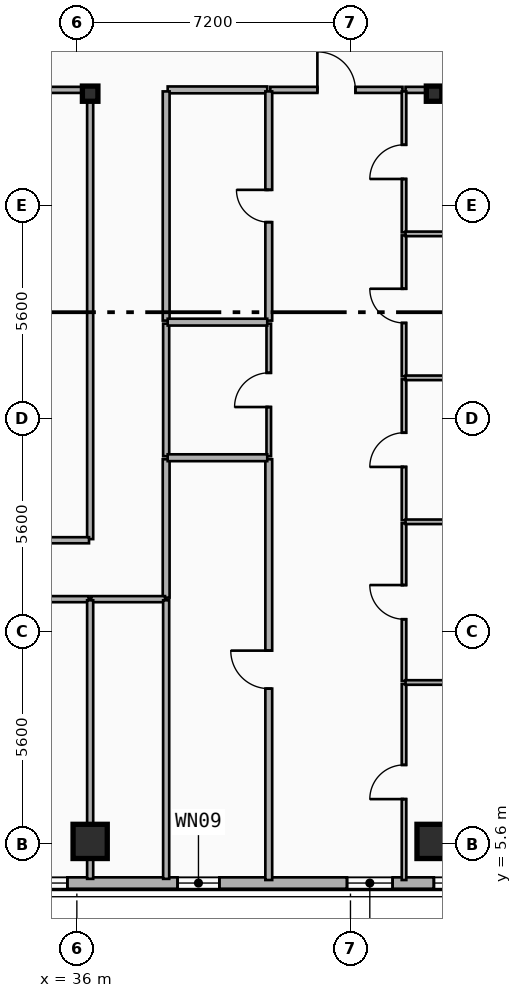
"""IFC4 building model, lengths in metres.
Left out: names, types, materials, properties, quantities, classifications, styles, units other than length and angle.
Written with IfcOpenShell. Run it as: python <this file> out.ifc"""

import sys

from ifc_helpers import new_model, si_unit, direction, frame, frame_2d, origin, origin_2d, place, context, subcontext, project, spatial, rectangle, i_section, extrude, element, fill, save


model = new_model("IFC4")
c1 = context("Model", 3, precision=1e-05, world=origin(), true_north=direction((0.0, 1.0)))
c2 = subcontext(c1, "Body", "Model", "MODEL_VIEW")
j1 = project(units=[si_unit("LENGTHUNIT", "METRE"), si_unit("PLANEANGLEUNIT", "RADIAN")], contexts=[c1])
p1 = place(None, origin())
s1 = spatial("IfcSite", under=j1, at=p1, CompositionType="ELEMENT")
p2 = place(p1, origin())
s2 = spatial("IfcBuilding", under=s1, at=p2, CompositionType="ELEMENT")
p3 = place(p2, frame((0.0, 0.0, 225.6)))
s3 = spatial("IfcBuildingStorey", under=s2, at=p3, CompositionType="ELEMENT", Elevation=225.6)
for number, where, z_axis, x_axis in (
    (1, (36.35, 25.35, 0.0), (0.0, 0.0, 1.0), (1.0, 0.0, 0.0)),
    (2, (45.4, 25.35, 0.0), (0.0, 0.0, 1.0), (1.0, 0.0, 0.0)),
):
    element("IfcColumn", number, at=place(p3, frame(where, z_axis=z_axis, x_axis=x_axis)), inside=s3, PredefinedType="COLUMN", context=c2, shape_type="SweptSolid", body=[
        extrude(i_section(OverallWidth=0.408, OverallDepth=0.4, WebThickness=0.025, FlangeThickness=0.039, FilletRadius=0.015, at=origin_2d()), origin(), (0.0, 0.0, 1.0), 3.6),
    ])
for number, where, z_axis, x_axis in (
    (3, (36.35, 5.784, 0.0), (0.0, -0.09, 0.996), (1.0, 0.0, 0.0)),
    (4, (45.4, 5.784, 0.0), (0.0, -0.09, 0.996), (1.0, 0.0, 0.0)),
):
    element("IfcColumn", number, at=place(p3, frame(where, z_axis=z_axis, x_axis=x_axis)), inside=s3, PredefinedType="COLUMN", context=c2, shape_type="SweptSolid", body=[
        extrude(rectangle(XDim=0.9, YDim=0.9, at=origin_2d()), origin(), (0.0, 0.0, 1.0), 3.615),
    ])
p4 = place(p3, frame((48.0, 4.58, 0.0), z_axis=(0.0, 0.0, 1.0), x_axis=(-1.0, 0.0, 0.0)))
e5 = element("IfcWall", 5, at=p4, inside=s3, PredefinedType="SOLIDWALL", context=c2, shape_type="SweptSolid", body=[
    extrude(rectangle(XDim=38.4, YDim=0.3, at=frame_2d((19.2, 0.0))), origin(), (0.0, 0.0, 1.0), 3.34),
])
p5 = place(p4, frame((33.709, 0.0, 0.34)))
e6 = element("IfcOpeningElement", 6, at=p5, cuts=e5, PredefinedType="OPENING", context=c2, shape_type="SweptSolid", body=[
    extrude(rectangle(XDim=1.4, YDim=1.8, at=frame_2d((0.7, 0.9))), frame((0.0, 0.16, 0.0), z_axis=(0.0, -1.0, 0.0), x_axis=(1.0, 0.0, 0.0)), (0.0, 0.0, 1.0), 0.32),
])
p6 = place(p4, frame((29.45, 0.0, 1.85)))
e7 = element("IfcOpeningElement", 7, at=p6, cuts=e5, PredefinedType="OPENING", context=c2, shape_type="SweptSolid", body=[
    extrude(rectangle(XDim=1.1, YDim=0.9, at=frame_2d((0.55, 0.45))), frame((0.0, 0.16, 0.0), z_axis=(0.0, -1.0, 0.0), x_axis=(1.0, 0.0, 0.0)), (0.0, 0.0, 1.0), 0.32),
])
p7 = place(p4, frame((35.994, 0.0, 0.48)))
e8 = element("IfcOpeningElement", 8, at=p7, cuts=e5, PredefinedType="OPENING", context=c2, shape_type="SweptSolid", body=[
    extrude(rectangle(XDim=1.8, YDim=1.8, at=frame_2d((0.9, 0.9))), frame((0.0, 0.16, 0.0), z_axis=(0.0, -1.0, 0.0), x_axis=(1.0, 0.0, 0.0)), (0.0, 0.0, 1.0), 0.32),
])
p8 = place(p4, frame((14.65, 0.0, 0.65)))
e9 = element("IfcOpeningElement", 9, at=p8, cuts=e5, PredefinedType="OPENING", context=c2, shape_type="SweptSolid", body=[
    extrude(rectangle(XDim=2.0, YDim=2.2, at=frame_2d((1.0, 1.1))), frame((0.0, 0.16, 0.0), z_axis=(0.0, -1.0, 0.0), x_axis=(1.0, 0.0, 0.0)), (0.0, 0.0, 1.0), 0.32),
])
p9 = place(p4, frame((23.4, 0.0, 0.65)))
e10 = element("IfcOpeningElement", 10, at=p9, cuts=e5, PredefinedType="OPENING", context=c2, shape_type="SweptSolid", body=[
    extrude(rectangle(XDim=2.0, YDim=2.2, at=frame_2d((1.0, 1.1))), frame((0.0, 0.16, 0.0), z_axis=(0.0, -1.0, 0.0), x_axis=(1.0, 0.0, 0.0)), (0.0, 0.0, 1.0), 0.32),
])
p10 = place(p4, frame((12.25, 0.0, 0.8)))
e11 = element("IfcOpeningElement", 11, at=p10, cuts=e5, PredefinedType="OPENING", context=c2, shape_type="SweptSolid", body=[
    extrude(rectangle(XDim=1.8, YDim=1.8, at=frame_2d((0.9, 0.9))), frame((0.0, 0.16, 0.0), z_axis=(0.0, -1.0, 0.0), x_axis=(1.0, 0.0, 0.0)), (0.0, 0.0, 1.0), 0.32),
])
p11 = place(p4, frame((3.691, 0.0, 1.22)))
e12 = element("IfcOpeningElement", 12, at=p11, cuts=e5, PredefinedType="OPENING", context=c2, shape_type="SweptSolid", body=[
    extrude(rectangle(XDim=1.2, YDim=1.5, at=frame_2d((0.6, 0.75))), frame((0.0, 0.16, 0.0), z_axis=(0.0, -1.0, 0.0), x_axis=(1.0, 0.0, 0.0)), (0.0, 0.0, 1.0), 0.32),
])
p12 = place(p4, frame((8.25, 0.0, 0.52)))
e13 = element("IfcOpeningElement", 13, at=p12, cuts=e5, PredefinedType="OPENING", context=c2, shape_type="SweptSolid", body=[
    extrude(rectangle(XDim=1.1, YDim=1.05, at=frame_2d((0.55, 0.525))), frame((0.0, 0.16, 0.0), z_axis=(0.0, -1.0, 0.0), x_axis=(1.0, 0.0, 0.0)), (0.0, 0.0, 1.0), 0.32),
])
p13 = place(p4, frame((0.805, 0.0, 0.48)))
e14 = element("IfcOpeningElement", 14, at=p13, cuts=e5, PredefinedType="OPENING", context=c2, shape_type="SweptSolid", body=[
    extrude(rectangle(XDim=1.8, YDim=1.8, at=frame_2d((0.9, 0.9))), frame((0.0, 0.16, 0.0), z_axis=(0.0, -1.0, 0.0), x_axis=(1.0, 0.0, 0.0)), (0.0, 0.0, 1.0), 0.32),
])
p14 = place(p3, frame((41.09, 25.45, 0.0), z_axis=(0.0, 0.0, 1.0), x_axis=(1.0, 0.0, 0.0)))
e15 = element("IfcWall", 15, at=p14, inside=s3, PredefinedType="PARTITIONING", context=c2, shape_type="SweptSolid", body=[
    extrude(rectangle(XDim=3.479, YDim=0.16, at=frame_2d((1.74, 0.0))), origin(), (0.0, 0.0, 1.0), 3.34),
])
p15 = place(p14, frame((1.24, 0.0, 0.0)))
e16 = element("IfcOpeningElement", 16, at=p15, cuts=e15, PredefinedType="OPENING", context=c2, shape_type="SweptSolid", body=[
    extrude(rectangle(XDim=1.0, YDim=2.15, at=frame_2d((0.5, 1.075))), frame((0.0, 0.09, 0.0), z_axis=(0.0, -1.0, 0.0), x_axis=(1.0, 0.0, 0.0)), (0.0, 0.0, 1.0), 0.18),
])
p16 = place(p3, frame((38.39, 25.45, 0.0), z_axis=(0.0, 0.0, 1.0), x_axis=(1.0, 0.0, 0.0)))
e17 = element("IfcWall", 17, at=p16, inside=s3, PredefinedType="PLUMBINGWALL", context=c2, shape_type="SweptSolid", body=[
    extrude(rectangle(XDim=2.62, YDim=0.18, at=frame_2d((1.31, 0.0))), origin(), (0.0, 0.0, 1.0), 3.34),
])
p17 = place(p3, frame((44.649, 25.45, 0.0), z_axis=(0.0, 0.0, 1.0), x_axis=(1.0, 0.0, 0.0)))
e18 = element("IfcWall", 18, at=p17, inside=s3, PredefinedType="PARTITIONING", context=c2, shape_type="SweptSolid", body=[
    extrude(rectangle(XDim=7.291, YDim=0.16, at=frame_2d((3.646, 0.0))), origin(), (0.0, 0.0, 1.0), 2.52),
])
p18 = place(p3, frame((38.35, 12.09, 0.0), z_axis=(0.0, 0.0, 1.0), x_axis=(0.0, 1.0, 0.0)))
e19 = element("IfcWall", 19, at=p18, inside=s3, PredefinedType="PLUMBINGWALL", context=c2, shape_type="SweptSolid", body=[
    extrude(rectangle(XDim=3.641, YDim=0.18, at=frame_2d((1.82, 0.0))), origin(), (0.0, 0.0, 1.0), 2.88),
])
p19 = place(p3, frame((38.35, 15.811, 0.0), z_axis=(0.0, 0.0, 1.0), x_axis=(0.0, 1.0, 0.0)))
e20 = element("IfcWall", 20, at=p19, inside=s3, PredefinedType="PARTITIONING", context=c2, shape_type="SweptSolid", body=[
    extrude(rectangle(XDim=3.488, YDim=0.16, at=frame_2d((1.744, 0.0))), origin(), (0.0, 0.0, 1.0), 2.87),
])
p20 = place(p3, frame((38.35, 19.379, 0.0), z_axis=(0.0, 0.0, 1.0), x_axis=(0.0, 1.0, 0.0)))
e21 = element("IfcWall", 21, at=p20, inside=s3, PredefinedType="PLUMBINGWALL", context=c2, shape_type="SweptSolid", body=[
    extrude(rectangle(XDim=6.031, YDim=0.18, at=frame_2d((3.016, 0.0))), origin(), (0.0, 0.0, 1.0), 2.87),
])
p21 = place(p3, frame((33.69, 12.05, 0.0), z_axis=(0.0, 0.0, 1.0), x_axis=(1.0, 0.0, 0.0)))
e22 = element("IfcWall", 22, at=p21, inside=s3, PredefinedType="PARTITIONING", context=c2, shape_type="SweptSolid", body=[
    extrude(rectangle(XDim=2.62, YDim=0.16, at=frame_2d((1.31, 0.0))), origin(), (0.0, 0.0, 1.0), 2.52),
])
p22 = place(p3, frame((41.05, 4.66, 0.0), z_axis=(0.0, 0.0, 1.0), x_axis=(0.0, 1.0, 0.0)))
e23 = element("IfcWall", 23, at=p22, inside=s3, PredefinedType="PLUMBINGWALL", context=c2, shape_type="SweptSolid", body=[
    extrude(rectangle(XDim=11.071, YDim=0.18, at=frame_2d((5.536, 0.0))), origin(), (0.0, 0.0, 1.0), 2.87),
])
p23 = place(p22, frame((5.035, 0.0, 0.0)))
e24 = element("IfcOpeningElement", 24, at=p23, cuts=e23, PredefinedType="OPENING", context=c2, shape_type="SweptSolid", body=[
    extrude(rectangle(XDim=1.0, YDim=2.15, at=frame_2d((0.5, 1.075))), frame((0.0, 0.1, 0.0), z_axis=(0.0, -1.0, 0.0), x_axis=(1.0, 0.0, 0.0)), (0.0, 0.0, 1.0), 0.2),
])
p24 = place(p3, frame((41.05, 15.811, 0.0), z_axis=(0.0, 0.0, 1.0), x_axis=(0.0, 1.0, 0.0)))
e25 = element("IfcWall", 25, at=p24, inside=s3, PredefinedType="PARTITIONING", context=c2, shape_type="SweptSolid", body=[
    extrude(rectangle(XDim=3.488, YDim=0.12, at=frame_2d((1.744, 0.0))), origin(), (0.0, 0.0, 1.0), 2.87),
])
p25 = place(p24, frame((1.294, 0.0, 0.0)))
e26 = element("IfcOpeningElement", 26, at=p25, cuts=e25, PredefinedType="OPENING", context=c2, shape_type="SweptSolid", body=[
    extrude(rectangle(XDim=0.9, YDim=2.1, at=frame_2d((0.45, 1.05))), frame((0.0, 0.07, 0.0), z_axis=(0.0, -1.0, 0.0), x_axis=(1.0, 0.0, 0.0)), (0.0, 0.0, 1.0), 0.14),
])
p26 = place(p3, frame((41.05, 19.379, 0.0), z_axis=(0.0, 0.0, 1.0), x_axis=(0.0, 1.0, 0.0)))
e27 = element("IfcWall", 27, at=p26, inside=s3, PredefinedType="PLUMBINGWALL", context=c2, shape_type="SweptSolid", body=[
    extrude(rectangle(XDim=6.031, YDim=0.18, at=frame_2d((3.016, 0.0))), origin(), (0.0, 0.0, 1.0), 2.87),
])
p27 = place(p26, frame((2.591, 0.0, 0.0)))
e28 = element("IfcOpeningElement", 28, at=p27, cuts=e27, PredefinedType="OPENING", context=c2, shape_type="SweptSolid", body=[
    extrude(rectangle(XDim=0.85, YDim=2.1, at=frame_2d((0.425, 1.05))), frame((0.0, 0.1, 0.0), z_axis=(0.0, -1.0, 0.0), x_axis=(1.0, 0.0, 0.0)), (0.0, 0.0, 1.0), 0.2),
])
p28 = place(p3, frame((44.609, 4.66, 0.0), z_axis=(0.0, 0.0, 1.0), x_axis=(0.0, 1.0, 0.0)))
e29 = element("IfcWall", 29, at=p28, inside=s3, PredefinedType="PARTITIONING", context=c2, shape_type="SweptSolid", body=[
    extrude(rectangle(XDim=5.157, YDim=0.12, at=frame_2d((2.579, 0.0))), origin(), (0.0, 0.0, 1.0), 2.87),
])
p29 = place(p28, frame((2.128, 0.0, 0.0)))
e30 = element("IfcOpeningElement", 30, at=p29, cuts=e29, PredefinedType="OPENING", context=c2, shape_type="SweptSolid", body=[
    extrude(rectangle(XDim=0.9, YDim=2.1, at=frame_2d((0.45, 1.05))), frame((0.0, 0.07, 0.0), z_axis=(0.0, -1.0, 0.0), x_axis=(1.0, 0.0, 0.0)), (0.0, 0.0, 1.0), 0.14),
])
p30 = place(p3, frame((44.609, 9.897, 0.0), z_axis=(0.0, 0.0, 1.0), x_axis=(0.0, 1.0, 0.0)))
e31 = element("IfcWall", 31, at=p30, inside=s3, PredefinedType="PARTITIONING", context=c2, shape_type="SweptSolid", body=[
    extrude(rectangle(XDim=4.148, YDim=0.12, at=frame_2d((2.074, 0.0))), origin(), (0.0, 0.0, 1.0), 2.88),
])
p31 = place(p30, frame((1.624, 0.0, 0.0)))
e32 = element("IfcOpeningElement", 32, at=p31, cuts=e31, PredefinedType="OPENING", context=c2, shape_type="SweptSolid", body=[
    extrude(rectangle(XDim=0.9, YDim=2.1, at=frame_2d((0.45, 1.05))), frame((0.0, 0.07, 0.0), z_axis=(0.0, -1.0, 0.0), x_axis=(1.0, 0.0, 0.0)), (0.0, 0.0, 1.0), 0.14),
])
p32 = place(p3, frame((44.609, 14.125, 0.0), z_axis=(0.0, 0.0, 1.0), x_axis=(0.0, 1.0, 0.0)))
e33 = element("IfcWall", 33, at=p32, inside=s3, PredefinedType="PARTITIONING", context=c2, shape_type="SweptSolid", body=[
    extrude(rectangle(XDim=3.708, YDim=0.12, at=frame_2d((1.854, 0.0))), origin(), (0.0, 0.0, 1.0), 2.87),
])
p33 = place(p32, frame((1.404, 0.0, 0.0)))
e34 = element("IfcOpeningElement", 34, at=p33, cuts=e33, PredefinedType="OPENING", context=c2, shape_type="SweptSolid", body=[
    extrude(rectangle(XDim=0.9, YDim=2.1, at=frame_2d((0.45, 1.05))), frame((0.0, 0.07, 0.0), z_axis=(0.0, -1.0, 0.0), x_axis=(1.0, 0.0, 0.0)), (0.0, 0.0, 1.0), 0.14),
])
p34 = place(p3, frame((44.609, 17.913, 0.0), z_axis=(0.0, 0.0, 1.0), x_axis=(0.0, 1.0, 0.0)))
e35 = element("IfcWall", 35, at=p34, inside=s3, PredefinedType="PARTITIONING", context=c2, shape_type="SweptSolid", body=[
    extrude(rectangle(XDim=3.708, YDim=0.12, at=frame_2d((1.854, 0.0))), origin(), (0.0, 0.0, 1.0), 2.88),
])
p35 = place(p34, frame((1.404, 0.0, 0.0)))
e36 = element("IfcOpeningElement", 36, at=p35, cuts=e35, PredefinedType="OPENING", context=c2, shape_type="SweptSolid", body=[
    extrude(rectangle(XDim=0.9, YDim=2.1, at=frame_2d((0.45, 1.05))), frame((0.0, 0.07, 0.0), z_axis=(0.0, -1.0, 0.0), x_axis=(1.0, 0.0, 0.0)), (0.0, 0.0, 1.0), 0.14),
])
p36 = place(p3, frame((44.609, 21.701, 0.0), z_axis=(0.0, 0.0, 1.0), x_axis=(0.0, 1.0, 0.0)))
e37 = element("IfcWall", 37, at=p36, inside=s3, PredefinedType="PARTITIONING", context=c2, shape_type="SweptSolid", body=[
    extrude(rectangle(XDim=3.709, YDim=0.12, at=frame_2d((1.854, 0.0))), origin(), (0.0, 0.0, 1.0), 2.87),
])
p37 = place(p36, frame((1.405, 0.0, 0.0)))
e38 = element("IfcOpeningElement", 38, at=p37, cuts=e37, PredefinedType="OPENING", context=c2, shape_type="SweptSolid", body=[
    extrude(rectangle(XDim=0.9, YDim=2.1, at=frame_2d((0.45, 1.05))), frame((0.0, 0.07, 0.0), z_axis=(0.0, -1.0, 0.0), x_axis=(1.0, 0.0, 0.0)), (0.0, 0.0, 1.0), 0.14),
])
p38 = place(p3, frame((38.39, 15.771, 0.0), z_axis=(0.0, 0.0, 1.0), x_axis=(1.0, 0.0, 0.0)))
e39 = element("IfcWall", 39, at=p38, inside=s3, PredefinedType="PLUMBINGWALL", context=c2, shape_type="SweptSolid", body=[
    extrude(rectangle(XDim=2.62, YDim=0.18, at=frame_2d((1.31, 0.0))), origin(), (0.0, 0.0, 1.0), 2.87),
])
p39 = place(p3, frame((38.39, 19.339, 0.0), z_axis=(0.0, 0.0, 1.0), x_axis=(1.0, 0.0, 0.0)))
e40 = element("IfcWall", 40, at=p39, inside=s3, PredefinedType="PLUMBINGWALL", context=c2, shape_type="SweptSolid", body=[
    extrude(rectangle(XDim=2.62, YDim=0.18, at=frame_2d((1.31, 0.0))), origin(), (0.0, 0.0, 1.0), 3.34),
])
for number, where, z_axis, x_axis in (
    (41, (44.649, 9.857, 0.0), (0.0, 0.0, 1.0), (1.0, 0.0, 0.0)),
    (42, (44.649, 14.085, 0.0), (0.0, 0.0, 1.0), (1.0, 0.0, 0.0)),
    (43, (44.649, 17.873, 0.0), (0.0, 0.0, 1.0), (1.0, 0.0, 0.0)),
    (44, (44.649, 21.661, 0.0), (0.0, 0.0, 1.0), (1.0, 0.0, 0.0)),
):
    element("IfcWall", number, at=place(p3, frame(where, z_axis=z_axis, x_axis=x_axis)), inside=s3, PredefinedType="PARTITIONING", context=c2, shape_type="SweptSolid", body=[
        extrude(rectangle(XDim=7.291, YDim=0.12, at=frame_2d((3.646, 0.0))), origin(), (0.0, 0.0, 1.0), 2.52),
    ])
p40 = place(p3, frame((20.48, 25.45, 0.0), z_axis=(0.0, 0.0, 1.0), x_axis=(1.0, 0.0, 0.0)))
e45 = element("IfcWall", 45, at=p40, inside=s3, PredefinedType="PARTITIONING", context=c2, shape_type="SweptSolid", body=[
    extrude(rectangle(XDim=15.84, YDim=0.16, at=frame_2d((7.92, 0.0))), origin(), (0.0, 0.0, 1.0), 2.52),
])
p41 = place(p3, frame((36.38, 12.05, 0.0), z_axis=(0.0, 0.0, 1.0), x_axis=(1.0, 0.0, 0.0)))
e46 = element("IfcWall", 46, at=p41, inside=s3, PredefinedType="PARTITIONING", context=c2, shape_type="SweptSolid", body=[
    extrude(rectangle(XDim=1.94, YDim=0.16, at=frame_2d((0.97, 0.0))), origin(), (0.0, 0.0, 1.0), 2.52),
])
p42 = place(p3, frame((36.35, 13.63, 0.0), z_axis=(0.0, 0.0, 1.0), x_axis=(0.0, 1.0, 0.0)))
e47 = element("IfcWall", 47, at=p42, inside=s3, PredefinedType="PARTITIONING", context=c2, shape_type="SweptSolid", body=[
    extrude(rectangle(XDim=11.79, YDim=0.16, at=frame_2d((5.895, 0.0))), origin(), (0.0, 0.0, 1.0), 2.52),
])
p43 = place(p3, frame((34.48, 13.6, 0.0), z_axis=(0.0, 0.0, 1.0), x_axis=(1.0, 0.0, 0.0)))
e48 = element("IfcWall", 48, at=p43, inside=s3, PredefinedType="PARTITIONING", context=c2, shape_type="SweptSolid", body=[
    extrude(rectangle(XDim=1.84, YDim=0.16, at=frame_2d((0.92, 0.0))), origin(), (0.0, 0.0, 1.0), 2.52),
])
p44 = place(p3, frame((36.35, 4.69, 0.0), z_axis=(0.0, 0.0, 1.0), x_axis=(0.0, 1.0, 0.0)))
e49 = element("IfcWall", 49, at=p44, inside=s3, PredefinedType="PARTITIONING", context=c2, shape_type="SweptSolid", body=[
    extrude(rectangle(XDim=7.33, YDim=0.16, at=frame_2d((3.665, 0.0))), origin(), (0.0, 0.0, 1.0), 2.52),
])
p45 = place(p3, frame((38.35, 4.69, 0.0), z_axis=(0.0, 0.0, 1.0), x_axis=(0.0, 1.0, 0.0)))
e50 = element("IfcWall", 50, at=p45, inside=s3, PredefinedType="PARTITIONING", context=c2, shape_type="SweptSolid", body=[
    extrude(rectangle(XDim=7.33, YDim=0.16, at=frame_2d((3.665, 0.0))), origin(), (0.0, 0.0, 1.0), 2.87),
])
p46 = place(p10, origin())
e51 = element("IfcWindow", 51, at=p46, inside=s3, PartitioningType="SINGLE_PANEL", PredefinedType="WINDOW", context=c2, shape_type="SweptSolid", body=[
    extrude(rectangle(XDim=1.8, YDim=1.8, at=frame_2d((0.9, 0.9))), frame((0.0, 0.03, 0.0), z_axis=(0.0, -1.0, 0.0), x_axis=(1.0, 0.0, 0.0)), (0.0, 0.0, 1.0), 0.06),
])
fill(e11, e51)
p47 = place(p11, origin())
e52 = element("IfcWindow", 52, at=p47, inside=s3, PartitioningType="SINGLE_PANEL", PredefinedType="WINDOW", context=c2, shape_type="SweptSolid", body=[
    extrude(rectangle(XDim=1.2, YDim=1.5, at=frame_2d((0.6, 0.75))), frame((0.0, 0.03, 0.0), z_axis=(0.0, -1.0, 0.0), x_axis=(1.0, 0.0, 0.0)), (0.0, 0.0, 1.0), 0.06),
])
fill(e12, e52)
p48 = place(p12, origin())
e53 = element("IfcWindow", 53, at=p48, inside=s3, PartitioningType="SINGLE_PANEL", PredefinedType="WINDOW", context=c2, shape_type="SweptSolid", body=[
    extrude(rectangle(XDim=1.1, YDim=1.05, at=frame_2d((0.55, 0.525))), frame((0.0, 0.03, 0.0), z_axis=(0.0, -1.0, 0.0), x_axis=(1.0, 0.0, 0.0)), (0.0, 0.0, 1.0), 0.06),
])
fill(e13, e53)
p49 = place(p13, origin())
e54 = element("IfcWindow", 54, at=p49, inside=s3, PartitioningType="SINGLE_PANEL", PredefinedType="WINDOW", context=c2, shape_type="SweptSolid", body=[
    extrude(rectangle(XDim=1.8, YDim=1.8, at=frame_2d((0.9, 0.9))), frame((0.0, 0.03, 0.0), z_axis=(0.0, -1.0, 0.0), x_axis=(1.0, 0.0, 0.0)), (0.0, 0.0, 1.0), 0.06),
])
fill(e14, e54)
p50 = place(p15, origin())
e55 = element("IfcDoor", 55, at=p50, inside=s3, OperationType="SINGLE_SWING_LEFT", PredefinedType="DOOR", context=c2, shape_type="SweptSolid", body=[
    extrude(rectangle(XDim=1.0, YDim=2.15, at=frame_2d((0.5, 1.075))), frame((0.0, 0.025, 0.0), z_axis=(0.0, -1.0, 0.0), x_axis=(1.0, 0.0, 0.0)), (0.0, 0.0, 1.0), 0.05),
])
fill(e16, e55)
p51 = place(p23, origin())
e56 = element("IfcDoor", 56, at=p51, inside=s3, OperationType="SINGLE_SWING_RIGHT", PredefinedType="DOOR", context=c2, shape_type="SweptSolid", body=[
    extrude(rectangle(XDim=1.0, YDim=2.15, at=frame_2d((0.5, 1.075))), frame((0.0, 0.025, 0.0), z_axis=(0.0, -1.0, 0.0), x_axis=(1.0, 0.0, 0.0)), (0.0, 0.0, 1.0), 0.05),
])
fill(e24, e56)
p52 = place(p25, origin())
e57 = element("IfcDoor", 57, at=p52, inside=s3, OperationType="SINGLE_SWING_LEFT", PredefinedType="DOOR", context=c2, shape_type="SweptSolid", body=[
    extrude(rectangle(XDim=0.9, YDim=2.1, at=frame_2d((0.45, 1.05))), frame((0.0, 0.025, 0.0), z_axis=(0.0, -1.0, 0.0), x_axis=(1.0, 0.0, 0.0)), (0.0, 0.0, 1.0), 0.05),
])
fill(e26, e57)
p53 = place(p27, origin())
e58 = element("IfcDoor", 58, at=p53, inside=s3, OperationType="SINGLE_SWING_RIGHT", PredefinedType="DOOR", context=c2, shape_type="SweptSolid", body=[
    extrude(rectangle(XDim=0.85, YDim=2.1, at=frame_2d((0.425, 1.05))), frame((0.0, 0.025, 0.0), z_axis=(0.0, -1.0, 0.0), x_axis=(1.0, 0.0, 0.0)), (0.0, 0.0, 1.0), 0.05),
])
fill(e28, e58)
p54 = place(p29, origin())
e59 = element("IfcDoor", 59, at=p54, inside=s3, OperationType="SINGLE_SWING_LEFT", PredefinedType="DOOR", context=c2, shape_type="SweptSolid", body=[
    extrude(rectangle(XDim=0.9, YDim=2.1, at=frame_2d((0.45, 1.05))), frame((0.0, 0.025, 0.0), z_axis=(0.0, -1.0, 0.0), x_axis=(1.0, 0.0, 0.0)), (0.0, 0.0, 1.0), 0.05),
])
fill(e30, e59)
p55 = place(p31, origin())
e60 = element("IfcDoor", 60, at=p55, inside=s3, OperationType="SINGLE_SWING_RIGHT", PredefinedType="DOOR", context=c2, shape_type="SweptSolid", body=[
    extrude(rectangle(XDim=0.9, YDim=2.1, at=frame_2d((0.45, 1.05))), frame((0.0, 0.025, 0.0), z_axis=(0.0, -1.0, 0.0), x_axis=(1.0, 0.0, 0.0)), (0.0, 0.0, 1.0), 0.05),
])
fill(e32, e60)
p56 = place(p33, origin())
e61 = element("IfcDoor", 61, at=p56, inside=s3, OperationType="SINGLE_SWING_LEFT", PredefinedType="DOOR", context=c2, shape_type="SweptSolid", body=[
    extrude(rectangle(XDim=0.9, YDim=2.1, at=frame_2d((0.45, 1.05))), frame((0.0, 0.025, 0.0), z_axis=(0.0, -1.0, 0.0), x_axis=(1.0, 0.0, 0.0)), (0.0, 0.0, 1.0), 0.05),
])
fill(e34, e61)
p57 = place(p35, origin())
e62 = element("IfcDoor", 62, at=p57, inside=s3, OperationType="SINGLE_SWING_RIGHT", PredefinedType="DOOR", context=c2, shape_type="SweptSolid", body=[
    extrude(rectangle(XDim=0.9, YDim=2.1, at=frame_2d((0.45, 1.05))), frame((0.0, 0.025, 0.0), z_axis=(0.0, -1.0, 0.0), x_axis=(1.0, 0.0, 0.0)), (0.0, 0.0, 1.0), 0.05),
])
fill(e36, e62)
p58 = place(p37, origin())
e63 = element("IfcDoor", 63, at=p58, inside=s3, OperationType="SINGLE_SWING_LEFT", PredefinedType="DOOR", context=c2, shape_type="SweptSolid", body=[
    extrude(rectangle(XDim=0.9, YDim=2.1, at=frame_2d((0.45, 1.05))), frame((0.0, 0.025, 0.0), z_axis=(0.0, -1.0, 0.0), x_axis=(1.0, 0.0, 0.0)), (0.0, 0.0, 1.0), 0.05),
])
fill(e38, e63)
save(model, sys.argv[1])
